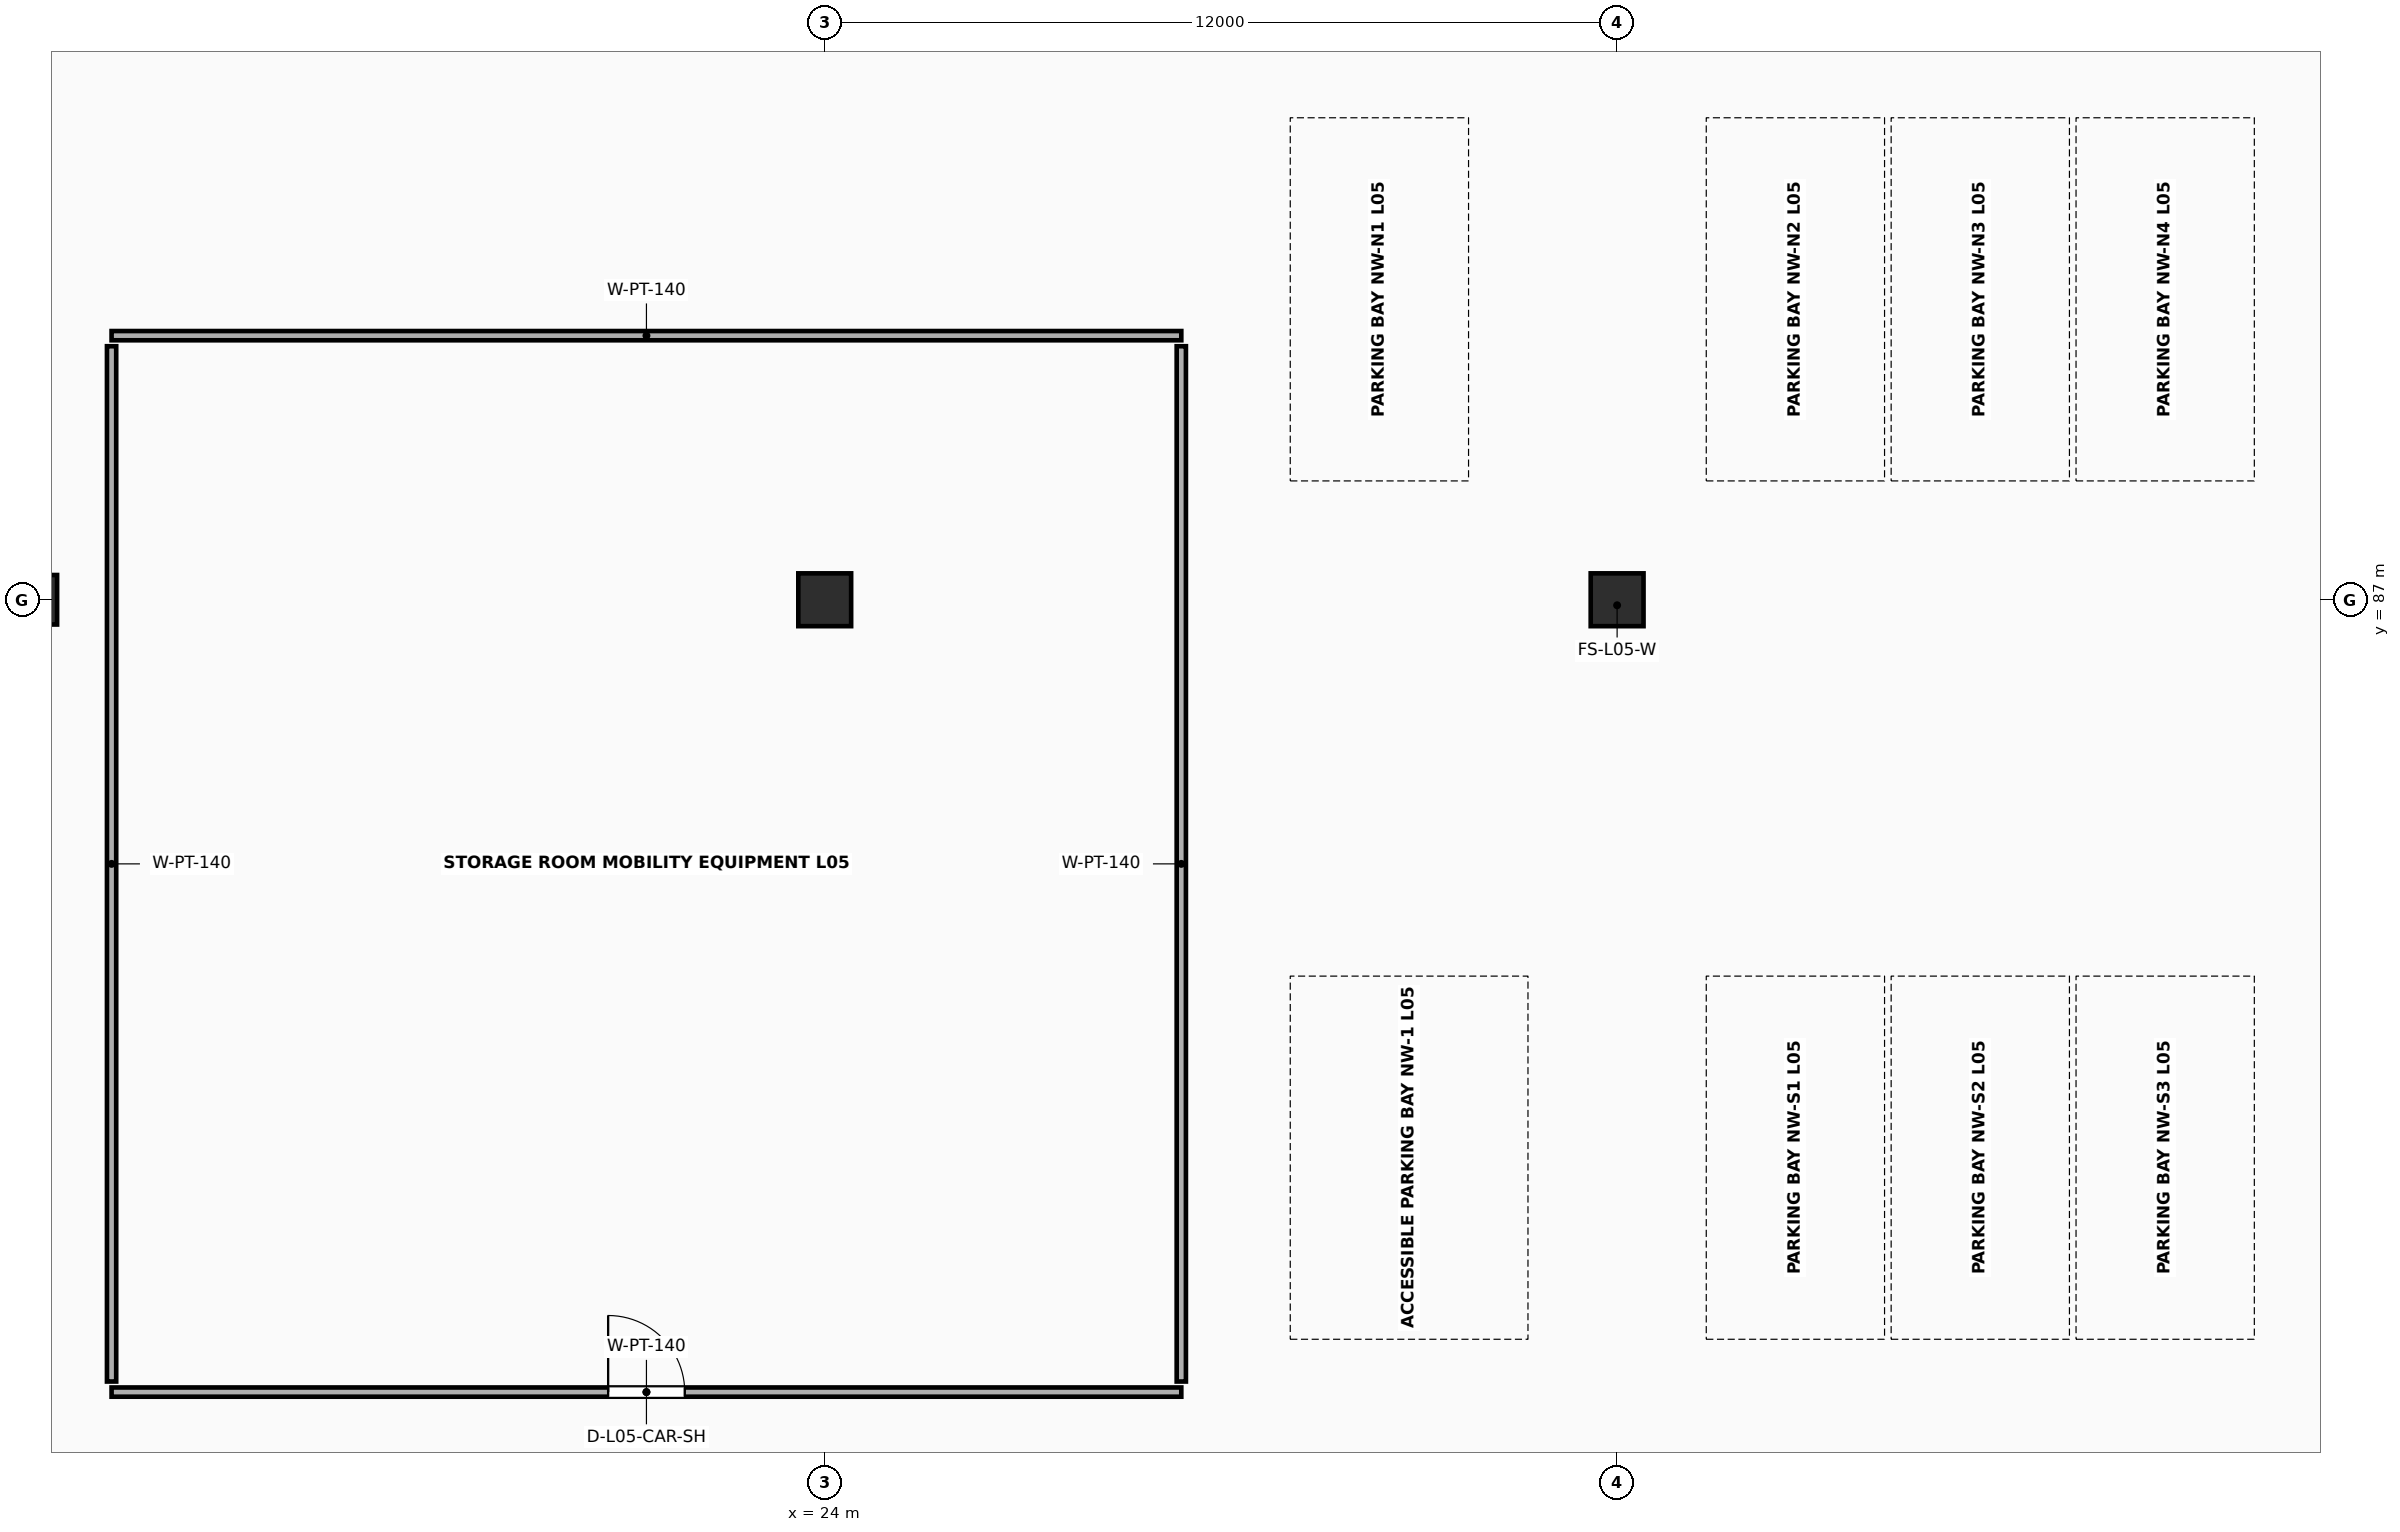
"""IFC4 building model, lengths in metres.
Left out: names, types, materials, properties, quantities, classifications, styles, units other than length and angle.
Written with IfcOpenShell. Run it as: python <this file> out.ifc"""

import sys

from ifc_helpers import new_model, si_unit, direction, frame, frame_2d, origin, origin_2d, place, context, subcontext, project, spatial, rectangle, extrude, element, fill, save


model = new_model("IFC4")
c1 = context("Model", 3, precision=1e-05, world=origin(), true_north=direction((0.0, 1.0)))
c2 = subcontext(c1, "Body", "Model", "MODEL_VIEW")
j1 = project(units=[si_unit("LENGTHUNIT", "METRE"), si_unit("PLANEANGLEUNIT", "RADIAN")], contexts=[c1])
p1 = place(None, origin())
s1 = spatial("IfcSite", under=j1, at=p1, CompositionType="ELEMENT")
p2 = place(p1, origin())
s2 = spatial("IfcBuilding", under=s1, at=p2, CompositionType="ELEMENT")
p3 = place(p2, frame((0.0, 0.0, 21.0)))
s3 = spatial("IfcBuildingStorey", under=s2, at=p3, CompositionType="ELEMENT", Elevation=21.0)
p4 = place(p3, frame((12.0, 87.0, 0.0), z_axis=(0.0, 0.0, 1.0), x_axis=(1.0, 0.0, 0.0)))
e1 = element("IfcColumn", 1, at=p4, inside=s3, PredefinedType="COLUMN", context=c2, shape_type="SweptSolid", body=[
    extrude(rectangle(XDim=0.75, YDim=0.75, at=origin_2d()), origin(), (0.0, 0.0, 1.0), 3.8),
])
for number, where, z_axis, x_axis in (
    (2, (24.0, 87.0, 0.0), (0.0, 0.0, 1.0), (1.0, 0.0, 0.0)),
    (3, (36.0, 87.0, 0.0), (0.0, 0.0, 1.0), (1.0, 0.0, 0.0)),
):
    element("IfcColumn", number, at=place(p3, frame(where, z_axis=z_axis, x_axis=x_axis)), inside=s3, PredefinedType="COLUMN", context=c2, shape_type="SweptSolid", body=[
        extrude(rectangle(XDim=0.8, YDim=0.8, at=origin_2d()), origin(), (0.0, 0.0, 1.0), 3.8),
    ])
p5 = place(p3, frame((13.2, 75.0, 0.0), z_axis=(0.0, 0.0, 1.0), x_axis=(1.0, 0.0, 0.0)))
e4 = element("IfcWall", 4, at=p5, inside=s3, PredefinedType="PARTITIONING", context=c2, shape_type="SweptSolid", body=[
    extrude(rectangle(XDim=16.2, YDim=0.14, at=frame_2d((8.1, 0.0))), origin(), (0.0, 0.0, 1.0), 2.75),
])
p6 = place(p5, frame((7.52, 0.0, 0.0)))
e5 = element("IfcOpeningElement", 5, at=p6, cuts=e4, PredefinedType="OPENING", context=c2, shape_type="SweptSolid", body=[
    extrude(rectangle(XDim=1.16, YDim=2.23, at=frame_2d((0.58, 1.115))), frame((0.0, 0.085, 0.0), z_axis=(0.0, -1.0, 0.0), x_axis=(1.0, 0.0, 0.0)), (0.0, 0.0, 1.0), 0.17),
])
p7 = place(p3, frame((13.2, 91.0, 0.0), z_axis=(0.0, 0.0, 1.0), x_axis=(1.0, 0.0, 0.0)))
e6 = element("IfcWall", 6, at=p7, inside=s3, PredefinedType="PARTITIONING", context=c2, shape_type="SweptSolid", body=[
    extrude(rectangle(XDim=16.2, YDim=0.14, at=frame_2d((8.1, 0.0))), origin(), (0.0, 0.0, 1.0), 2.75),
])
for number, where, z_axis, x_axis in (
    (7, (13.2, 75.16, 0.0), (0.0, 0.0, 1.0), (0.0, 1.0, 0.0)),
    (8, (29.4, 75.16, 0.0), (0.0, 0.0, 1.0), (0.0, 1.0, 0.0)),
):
    element("IfcWall", number, at=place(p3, frame(where, z_axis=z_axis, x_axis=x_axis)), inside=s3, PredefinedType="PARTITIONING", context=c2, shape_type="SweptSolid", body=[
        extrude(rectangle(XDim=15.68, YDim=0.14, at=frame_2d((7.84, 0.0))), origin(), (0.0, 0.0, 1.0), 2.75),
    ])
p8 = place(p6, origin())
e9 = element("IfcDoor", 9, at=p8, inside=s3, OperationType="SINGLE_SWING_LEFT", PredefinedType="DOOR", context=c2, shape_type="SweptSolid", body=[
    extrude(rectangle(XDim=1.16, YDim=2.23, at=frame_2d((0.58, 1.115))), frame((0.0, 0.025, 0.0), z_axis=(0.0, -1.0, 0.0), x_axis=(1.0, 0.0, 0.0)), (0.0, 0.0, 1.0), 0.05),
])
fill(e5, e9)
save(model, sys.argv[1])
